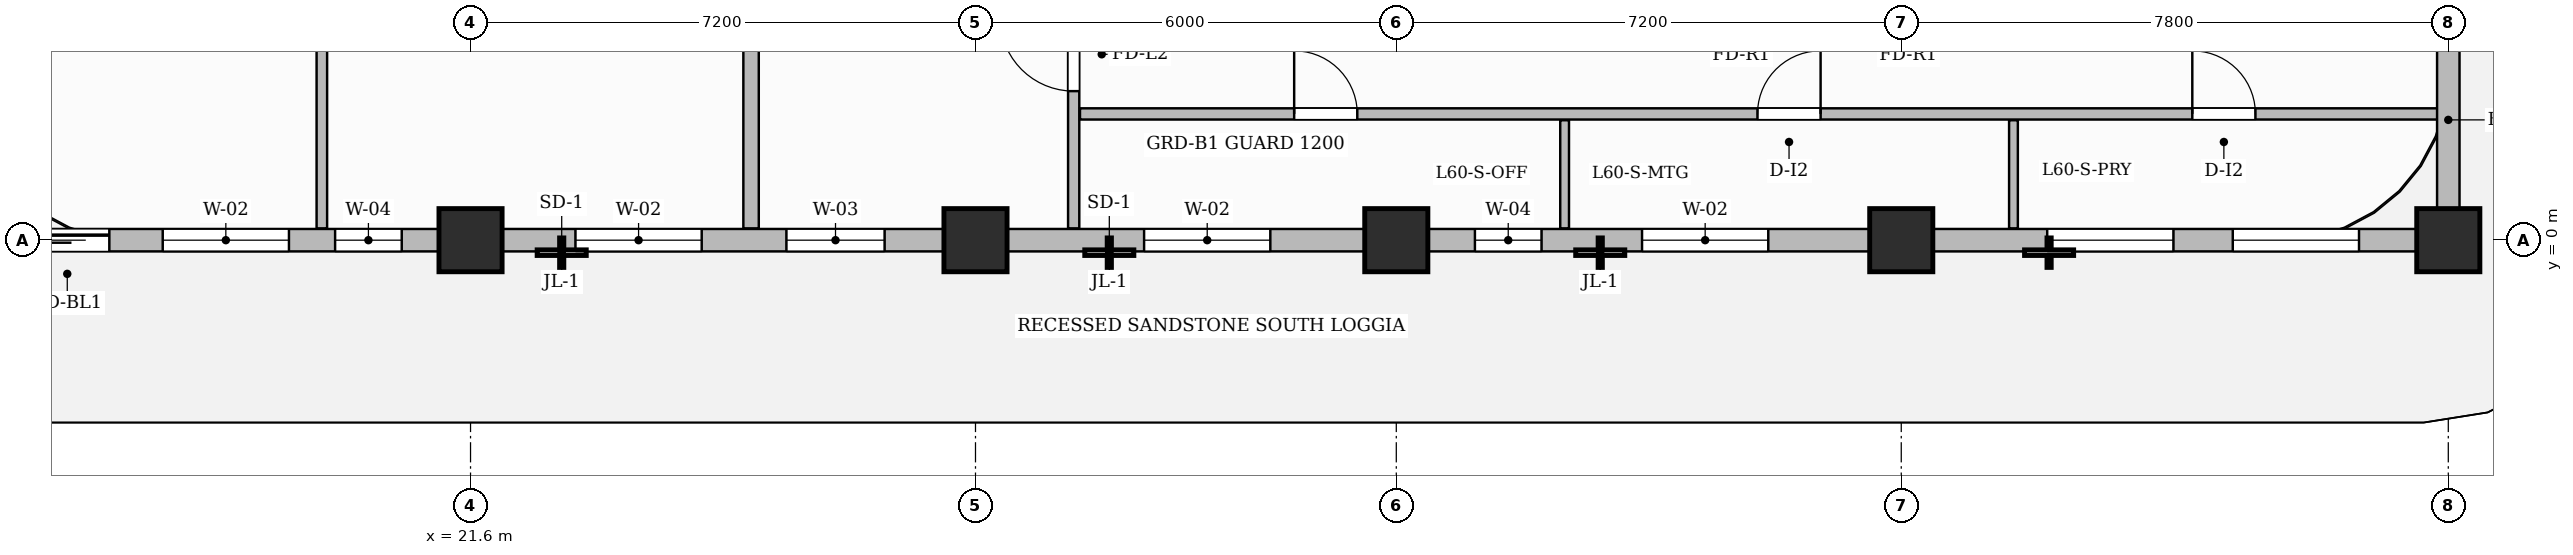
"""IFC4 building model, lengths in metres.
Left out: names, types, materials, properties, quantities, classifications, styles, units other than length and angle.
Written with IfcOpenShell. Run it as: python <this file> out.ifc"""

import sys

from ifc_helpers import new_model, si_unit, direction, frame, frame_2d, origin, origin_2d, place, context, subcontext, project, spatial, rectangle, extrude, source, transform, mapped, element, fill, save


model = new_model("IFC4")
c1 = context("Model", 3, precision=1e-05, world=origin(), true_north=direction((0.0, 1.0)))
c2 = subcontext(c1, "Body", "Model", "MODEL_VIEW")
j1 = project(units=[si_unit("LENGTHUNIT", "METRE"), si_unit("PLANEANGLEUNIT", "RADIAN")], contexts=[c1])
p1 = place(None, origin())
s1 = spatial("IfcSite", under=j1, at=p1, CompositionType="ELEMENT")
p2 = place(p1, origin())
s2 = spatial("IfcBuilding", under=s1, at=p2, CompositionType="ELEMENT")
p3 = place(p2, frame((0.0, 0.0, 240.4)))
s3 = spatial("IfcBuildingStorey", under=s2, at=p3, CompositionType="ELEMENT", Elevation=240.4)
m1 = source(origin(), c2, "Body", "SweptSolid", [
    extrude(rectangle(XDim=0.9, YDim=0.9, at=origin_2d()), origin(), (0.0, 0.0, 1.0), 3.85),
])
for number, where, z_axis, x_axis in (
    (1, (21.6, 0.0, 0.0), (0.0, 0.0, 1.0), (1.0, 0.0, 0.0)),
    (2, (28.8, 0.0, 0.0), (0.0, 0.0, 1.0), (1.0, 0.0, 0.0)),
    (3, (34.8, 0.0, 0.0), (0.0, 0.0, 1.0), (1.0, 0.0, 0.0)),
    (4, (42.0, 0.0, 0.0), (0.0, 0.0, 1.0), (1.0, 0.0, 0.0)),
    (5, (49.8, 0.0, 0.0), (0.0, 0.0, 1.0), (1.0, 0.0, 0.0)),
):
    element("IfcColumn", number, at=place(p3, frame(where, z_axis=z_axis, x_axis=x_axis)), inside=s3, PredefinedType="COLUMN", context=c2, shape_type="MappedRepresentation", body=[
        mapped(m1, transform((0.0, 0.0, 0.0), scale=1.0)),
    ])
p4 = place(p3, frame((30.2, 0.168, 0.0), z_axis=(0.0, 0.0, 1.0), x_axis=(0.0, 1.0, 0.0)))
e6 = element("IfcWall", 6, at=p4, inside=s3, PredefinedType="PARTITIONING", context=c2, shape_type="SweptSolid", body=[
    extrude(rectangle(XDim=10.092, YDim=0.16, at=frame_2d((5.046, 0.0))), origin(), (0.0, 0.0, 1.0), 3.6),
])
p5 = place(p4, frame((1.957, 0.0, 0.0)))
e7 = element("IfcOpeningElement", 7, at=p5, cuts=e6, PredefinedType="OPENING", context=c2, shape_type="SweptSolid", body=[
    extrude(rectangle(XDim=1.05, YDim=2.15, at=frame_2d((0.525, 1.075))), frame((0.0, 0.09, 0.0), z_axis=(0.0, -1.0, 0.0), x_axis=(1.0, 0.0, 0.0)), (0.0, 0.0, 1.0), 0.18),
])
p6 = place(p3, frame((30.29, 1.8, 0.0), z_axis=(0.0, 0.0, 1.0), x_axis=(1.0, 0.0, 0.0)))
e8 = element("IfcWall", 8, at=p6, inside=s3, PredefinedType="PARTITIONING", context=c2, shape_type="SweptSolid", body=[
    extrude(rectangle(XDim=19.37, YDim=0.16, at=frame_2d((9.685, 0.0))), origin(), (0.0, 0.0, 1.0), 3.6),
])
p7 = place(p6, frame((3.054, 0.0, 0.0)))
e9 = element("IfcOpeningElement", 9, at=p7, cuts=e8, PredefinedType="OPENING", context=c2, shape_type="SweptSolid", body=[
    extrude(rectangle(XDim=0.9, YDim=2.15, at=frame_2d((0.45, 1.075))), frame((0.0, 0.09, 0.0), z_axis=(0.0, -1.0, 0.0), x_axis=(1.0, 0.0, 0.0)), (0.0, 0.0, 1.0), 0.18),
])
p8 = place(p6, frame((9.66, 0.0, 0.0)))
e10 = element("IfcOpeningElement", 10, at=p8, cuts=e8, PredefinedType="OPENING", context=c2, shape_type="SweptSolid", body=[
    extrude(rectangle(XDim=0.9, YDim=2.15, at=frame_2d((0.45, 1.075))), frame((0.0, 0.09, 0.0), z_axis=(0.0, -1.0, 0.0), x_axis=(1.0, 0.0, 0.0)), (0.0, 0.0, 1.0), 0.18),
])
p9 = place(p6, frame((15.86, 0.0, 0.0)))
e11 = element("IfcOpeningElement", 11, at=p9, cuts=e8, PredefinedType="OPENING", context=c2, shape_type="SweptSolid", body=[
    extrude(rectangle(XDim=0.9, YDim=2.15, at=frame_2d((0.45, 1.075))), frame((0.0, 0.09, 0.0), z_axis=(0.0, -1.0, 0.0), x_axis=(1.0, 0.0, 0.0)), (0.0, 0.0, 1.0), 0.18),
])
for number, where, z_axis, x_axis in (
    (12, (37.2, 0.168, 0.0), (0.0, 0.0, 1.0), (0.0, 1.0, 0.0)),
    (13, (43.6, 0.168, 0.0), (0.0, 0.0, 1.0), (0.0, 1.0, 0.0)),
):
    element("IfcWall", number, at=place(p3, frame(where, z_axis=z_axis, x_axis=x_axis)), inside=s3, PredefinedType="PARTITIONING", context=c2, shape_type="SweptSolid", body=[
        extrude(rectangle(XDim=1.542, YDim=0.125, at=frame_2d((0.771, 0.0))), origin(), (0.0, 0.0, 1.0), 3.6),
    ])
p10 = place(p3, frame((25.6, 0.168, 0.0), z_axis=(0.0, 0.0, 1.0), x_axis=(0.0, 1.0, 0.0)))
e14 = element("IfcWall", 14, at=p10, inside=s3, PredefinedType="PARTITIONING", context=c2, shape_type="SweptSolid", body=[
    extrude(rectangle(XDim=10.092, YDim=0.22, at=frame_2d((5.046, 0.0))), origin(), (0.0, 0.0, 1.0), 3.6),
])
p11 = place(p3, frame((19.48, 0.168, 0.0), z_axis=(0.0, 0.0, 1.0), x_axis=(0.0, 1.0, 0.0)))
e15 = element("IfcWall", 15, at=p11, inside=s3, PredefinedType="PARTITIONING", context=c2, shape_type="SweptSolid", body=[
    extrude(rectangle(XDim=10.092, YDim=0.15, at=frame_2d((5.046, 0.0))), origin(), (0.0, 0.0, 1.0), 3.6),
])
p12 = place(p11, frame((8.657, 0.0, 0.0)))
e16 = element("IfcOpeningElement", 16, at=p12, cuts=e15, PredefinedType="OPENING", context=c2, shape_type="SweptSolid", body=[
    extrude(rectangle(XDim=0.9, YDim=2.15, at=frame_2d((0.45, 1.075))), frame((0.0, 0.085, 0.0), z_axis=(0.0, -1.0, 0.0), x_axis=(1.0, 0.0, 0.0)), (0.0, 0.0, 1.0), 0.17),
])
p13 = place(p3, frame((14.4, 0.0, 0.0), z_axis=(0.0, 0.0, 1.0), x_axis=(1.0, 0.0, 0.0)))
e17 = element("IfcWall", 17, at=p13, inside=s3, PredefinedType="SOLIDWALL", context=c2, shape_type="SweptSolid", body=[
    extrude(rectangle(XDim=35.4, YDim=0.32, at=frame_2d((17.7, 0.0))), origin(), (0.0, 0.0, 1.0), 3.135),
])
p14 = place(p13, frame((0.85, 0.0, 0.0)))
e18 = element("IfcOpeningElement", 18, at=p14, cuts=e17, PredefinedType="OPENING", context=c2, shape_type="SweptSolid", body=[
    extrude(rectangle(XDim=1.2, YDim=2.2, at=frame_2d((0.6, 1.1))), frame((0.0, 0.17, 0.0), z_axis=(0.0, -1.0, 0.0), x_axis=(1.0, 0.0, 0.0)), (0.0, 0.0, 1.0), 0.34),
])
p15 = place(p13, frame((2.811, 0.0, 0.8)))
e19 = element("IfcOpeningElement", 19, at=p15, cuts=e17, PredefinedType="OPENING", context=c2, shape_type="SweptSolid", body=[
    extrude(rectangle(XDim=1.8, YDim=1.85, at=frame_2d((0.9, 0.925))), frame((0.0, 0.17, 0.0), z_axis=(0.0, -1.0, 0.0), x_axis=(1.0, 0.0, 0.0)), (0.0, 0.0, 1.0), 0.34),
])
p16 = place(p13, frame((5.269, 0.0, 0.8)))
e20 = element("IfcOpeningElement", 20, at=p16, cuts=e17, PredefinedType="OPENING", context=c2, shape_type="SweptSolid", body=[
    extrude(rectangle(XDim=0.95, YDim=1.75, at=frame_2d((0.475, 0.875))), frame((0.0, 0.17, 0.0), z_axis=(0.0, -1.0, 0.0), x_axis=(1.0, 0.0, 0.0)), (0.0, 0.0, 1.0), 0.34),
])
p17 = place(p13, frame((8.696, 0.0, 0.8)))
e21 = element("IfcOpeningElement", 21, at=p17, cuts=e17, PredefinedType="OPENING", context=c2, shape_type="SweptSolid", body=[
    extrude(rectangle(XDim=1.8, YDim=1.85, at=frame_2d((0.9, 0.925))), frame((0.0, 0.17, 0.0), z_axis=(0.0, -1.0, 0.0), x_axis=(1.0, 0.0, 0.0)), (0.0, 0.0, 1.0), 0.34),
])
p18 = place(p13, frame((11.704, 0.0, 0.8)))
e22 = element("IfcOpeningElement", 22, at=p18, cuts=e17, PredefinedType="OPENING", context=c2, shape_type="SweptSolid", body=[
    extrude(rectangle(XDim=1.4, YDim=1.85, at=frame_2d((0.7, 0.925))), frame((0.0, 0.17, 0.0), z_axis=(0.0, -1.0, 0.0), x_axis=(1.0, 0.0, 0.0)), (0.0, 0.0, 1.0), 0.34),
])
p19 = place(p13, frame((16.804, 0.0, 0.8)))
e23 = element("IfcOpeningElement", 23, at=p19, cuts=e17, PredefinedType="OPENING", context=c2, shape_type="SweptSolid", body=[
    extrude(rectangle(XDim=1.8, YDim=1.85, at=frame_2d((0.9, 0.925))), frame((0.0, 0.17, 0.0), z_axis=(0.0, -1.0, 0.0), x_axis=(1.0, 0.0, 0.0)), (0.0, 0.0, 1.0), 0.34),
])
p20 = place(p13, frame((21.521, 0.0, 0.8)))
e24 = element("IfcOpeningElement", 24, at=p20, cuts=e17, PredefinedType="OPENING", context=c2, shape_type="SweptSolid", body=[
    extrude(rectangle(XDim=0.95, YDim=1.75, at=frame_2d((0.475, 0.875))), frame((0.0, 0.17, 0.0), z_axis=(0.0, -1.0, 0.0), x_axis=(1.0, 0.0, 0.0)), (0.0, 0.0, 1.0), 0.34),
])
p21 = place(p13, frame((23.904, 0.0, 0.8)))
e25 = element("IfcOpeningElement", 25, at=p21, cuts=e17, PredefinedType="OPENING", context=c2, shape_type="SweptSolid", body=[
    extrude(rectangle(XDim=1.8, YDim=1.85, at=frame_2d((0.9, 0.925))), frame((0.0, 0.17, 0.0), z_axis=(0.0, -1.0, 0.0), x_axis=(1.0, 0.0, 0.0)), (0.0, 0.0, 1.0), 0.34),
])
p22 = place(p13, frame((29.681, 0.0, 0.8)))
e26 = element("IfcOpeningElement", 26, at=p22, cuts=e17, PredefinedType="OPENING", context=c2, shape_type="SweptSolid", body=[
    extrude(rectangle(XDim=1.8, YDim=1.85, at=frame_2d((0.9, 0.925))), frame((0.0, 0.17, 0.0), z_axis=(0.0, -1.0, 0.0), x_axis=(1.0, 0.0, 0.0)), (0.0, 0.0, 1.0), 0.34),
])
p23 = place(p13, frame((32.327, 0.0, 0.8)))
e27 = element("IfcOpeningElement", 27, at=p23, cuts=e17, PredefinedType="OPENING", context=c2, shape_type="SweptSolid", body=[
    extrude(rectangle(XDim=1.8, YDim=1.85, at=frame_2d((0.9, 0.925))), frame((0.0, 0.17, 0.0), z_axis=(0.0, -1.0, 0.0), x_axis=(1.0, 0.0, 0.0)), (0.0, 0.0, 1.0), 0.34),
])
p24 = place(p3, frame((49.8, 0.05, 0.0), z_axis=(0.0, 0.0, 1.0), x_axis=(0.0, 1.0, 0.0)))
e28 = element("IfcWall", 28, at=p24, inside=s3, PredefinedType="SOLIDWALL", context=c2, shape_type="SweptSolid", body=[
    extrude(rectangle(XDim=3.33, YDim=0.32, at=frame_2d((1.665, 0.0))), origin(), (0.0, 0.0, 1.0), 3.6),
])
m2 = source(origin(), c2, "Body", "SweptSolid", [
    extrude(rectangle(XDim=1.05, YDim=2.15, at=frame_2d((0.525, 1.075))), frame((0.0, 0.025, 0.0), z_axis=(0.0, -1.0, 0.0), x_axis=(1.0, 0.0, 0.0)), (0.0, 0.0, 1.0), 0.05),
])
p25 = place(p5, origin())
e29 = element("IfcDoor", 29, at=p25, inside=s3, OperationType="SINGLE_SWING_RIGHT", PredefinedType="DOOR", context=c2, shape_type="MappedRepresentation", body=[
    mapped(m2, transform((0.0, 0.0, 0.0), scale=1.0)),
])
fill(e7, e29)
m3 = source(origin(), c2, "Body", "SweptSolid", [
    extrude(rectangle(XDim=0.9, YDim=2.15, at=frame_2d((0.45, 1.075))), frame((0.0, 0.025, 0.0), z_axis=(0.0, -1.0, 0.0), x_axis=(1.0, 0.0, 0.0)), (0.0, 0.0, 1.0), 0.05),
])
p26 = place(p7, origin())
e30 = element("IfcDoor", 30, at=p26, inside=s3, OperationType="SINGLE_SWING_LEFT", PredefinedType="DOOR", context=c2, shape_type="MappedRepresentation", body=[
    mapped(m3, transform((0.0, 0.0, 0.0), scale=1.0)),
])
fill(e9, e30)
p27 = place(p8, origin())
e31 = element("IfcDoor", 31, at=p27, inside=s3, OperationType="SINGLE_SWING_RIGHT", PredefinedType="DOOR", context=c2, shape_type="MappedRepresentation", body=[
    mapped(m3, transform((0.0, 0.0, 0.0), scale=1.0)),
])
fill(e10, e31)
p28 = place(p9, origin())
e32 = element("IfcDoor", 32, at=p28, inside=s3, OperationType="SINGLE_SWING_LEFT", PredefinedType="DOOR", context=c2, shape_type="MappedRepresentation", body=[
    mapped(m3, transform((0.0, 0.0, 0.0), scale=1.0)),
])
fill(e11, e32)
m4 = source(origin(), c2, "Body", "SweptSolid", [
    extrude(rectangle(XDim=1.2, YDim=2.2, at=frame_2d((0.6, 1.1))), frame((0.0, 0.025, 0.0), z_axis=(0.0, -1.0, 0.0), x_axis=(1.0, 0.0, 0.0)), (0.0, 0.0, 1.0), 0.05),
])
p29 = place(p14, origin())
e33 = element("IfcDoor", 33, at=p29, inside=s3, OperationType="SLIDING_TO_LEFT", PredefinedType="DOOR", context=c2, shape_type="MappedRepresentation", body=[
    mapped(m4, transform((0.0, 0.0, 0.0), scale=1.0)),
])
fill(e18, e33)
m5 = source(origin(), c2, "Body", "SweptSolid", [
    extrude(rectangle(XDim=1.8, YDim=1.85, at=frame_2d((0.9, 0.925))), frame((0.0, 0.03, 0.0), z_axis=(0.0, -1.0, 0.0), x_axis=(1.0, 0.0, 0.0)), (0.0, 0.0, 1.0), 0.06),
])
p30 = place(p15, origin())
e34 = element("IfcWindow", 34, at=p30, inside=s3, PartitioningType="DOUBLE_PANEL_VERTICAL", PredefinedType="WINDOW", context=c2, shape_type="MappedRepresentation", body=[
    mapped(m5, transform((0.0, 0.0, 0.0), scale=1.0)),
])
fill(e19, e34)
m6 = source(origin(), c2, "Body", "SweptSolid", [
    extrude(rectangle(XDim=0.95, YDim=1.75, at=frame_2d((0.475, 0.875))), frame((0.0, 0.03, 0.0), z_axis=(0.0, -1.0, 0.0), x_axis=(1.0, 0.0, 0.0)), (0.0, 0.0, 1.0), 0.06),
])
p31 = place(p16, origin())
e35 = element("IfcWindow", 35, at=p31, inside=s3, PartitioningType="SINGLE_PANEL", PredefinedType="WINDOW", context=c2, shape_type="MappedRepresentation", body=[
    mapped(m6, transform((0.0, 0.0, 0.0), scale=1.0)),
])
fill(e20, e35)
p32 = place(p17, origin())
e36 = element("IfcWindow", 36, at=p32, inside=s3, PartitioningType="DOUBLE_PANEL_VERTICAL", PredefinedType="WINDOW", context=c2, shape_type="MappedRepresentation", body=[
    mapped(m5, transform((0.0, 0.0, 0.0), scale=1.0)),
])
fill(e21, e36)
m7 = source(origin(), c2, "Body", "SweptSolid", [
    extrude(rectangle(XDim=1.4, YDim=1.85, at=frame_2d((0.7, 0.925))), frame((0.0, 0.03, 0.0), z_axis=(0.0, -1.0, 0.0), x_axis=(1.0, 0.0, 0.0)), (0.0, 0.0, 1.0), 0.06),
])
p33 = place(p18, origin())
e37 = element("IfcWindow", 37, at=p33, inside=s3, PartitioningType="SINGLE_PANEL", PredefinedType="WINDOW", context=c2, shape_type="MappedRepresentation", body=[
    mapped(m7, transform((0.0, 0.0, 0.0), scale=1.0)),
])
fill(e22, e37)
p34 = place(p19, origin())
e38 = element("IfcWindow", 38, at=p34, inside=s3, PartitioningType="DOUBLE_PANEL_VERTICAL", PredefinedType="WINDOW", context=c2, shape_type="MappedRepresentation", body=[
    mapped(m5, transform((0.0, 0.0, 0.0), scale=1.0)),
])
fill(e23, e38)
p35 = place(p20, origin())
e39 = element("IfcWindow", 39, at=p35, inside=s3, PartitioningType="SINGLE_PANEL", PredefinedType="WINDOW", context=c2, shape_type="MappedRepresentation", body=[
    mapped(m6, transform((0.0, 0.0, 0.0), scale=1.0)),
])
fill(e24, e39)
p36 = place(p21, origin())
e40 = element("IfcWindow", 40, at=p36, inside=s3, PartitioningType="DOUBLE_PANEL_VERTICAL", PredefinedType="WINDOW", context=c2, shape_type="MappedRepresentation", body=[
    mapped(m5, transform((0.0, 0.0, 0.0), scale=1.0)),
])
fill(e25, e40)
p37 = place(p22, origin())
e41 = element("IfcWindow", 41, at=p37, inside=s3, PartitioningType="DOUBLE_PANEL_VERTICAL", PredefinedType="WINDOW", context=c2, shape_type="MappedRepresentation", body=[
    mapped(m5, transform((0.0, 0.0, 0.0), scale=1.0)),
])
fill(e26, e41)
p38 = place(p23, origin())
e42 = element("IfcWindow", 42, at=p38, inside=s3, PartitioningType="DOUBLE_PANEL_VERTICAL", PredefinedType="WINDOW", context=c2, shape_type="MappedRepresentation", body=[
    mapped(m5, transform((0.0, 0.0, 0.0), scale=1.0)),
])
fill(e27, e42)
save(model, sys.argv[1])
